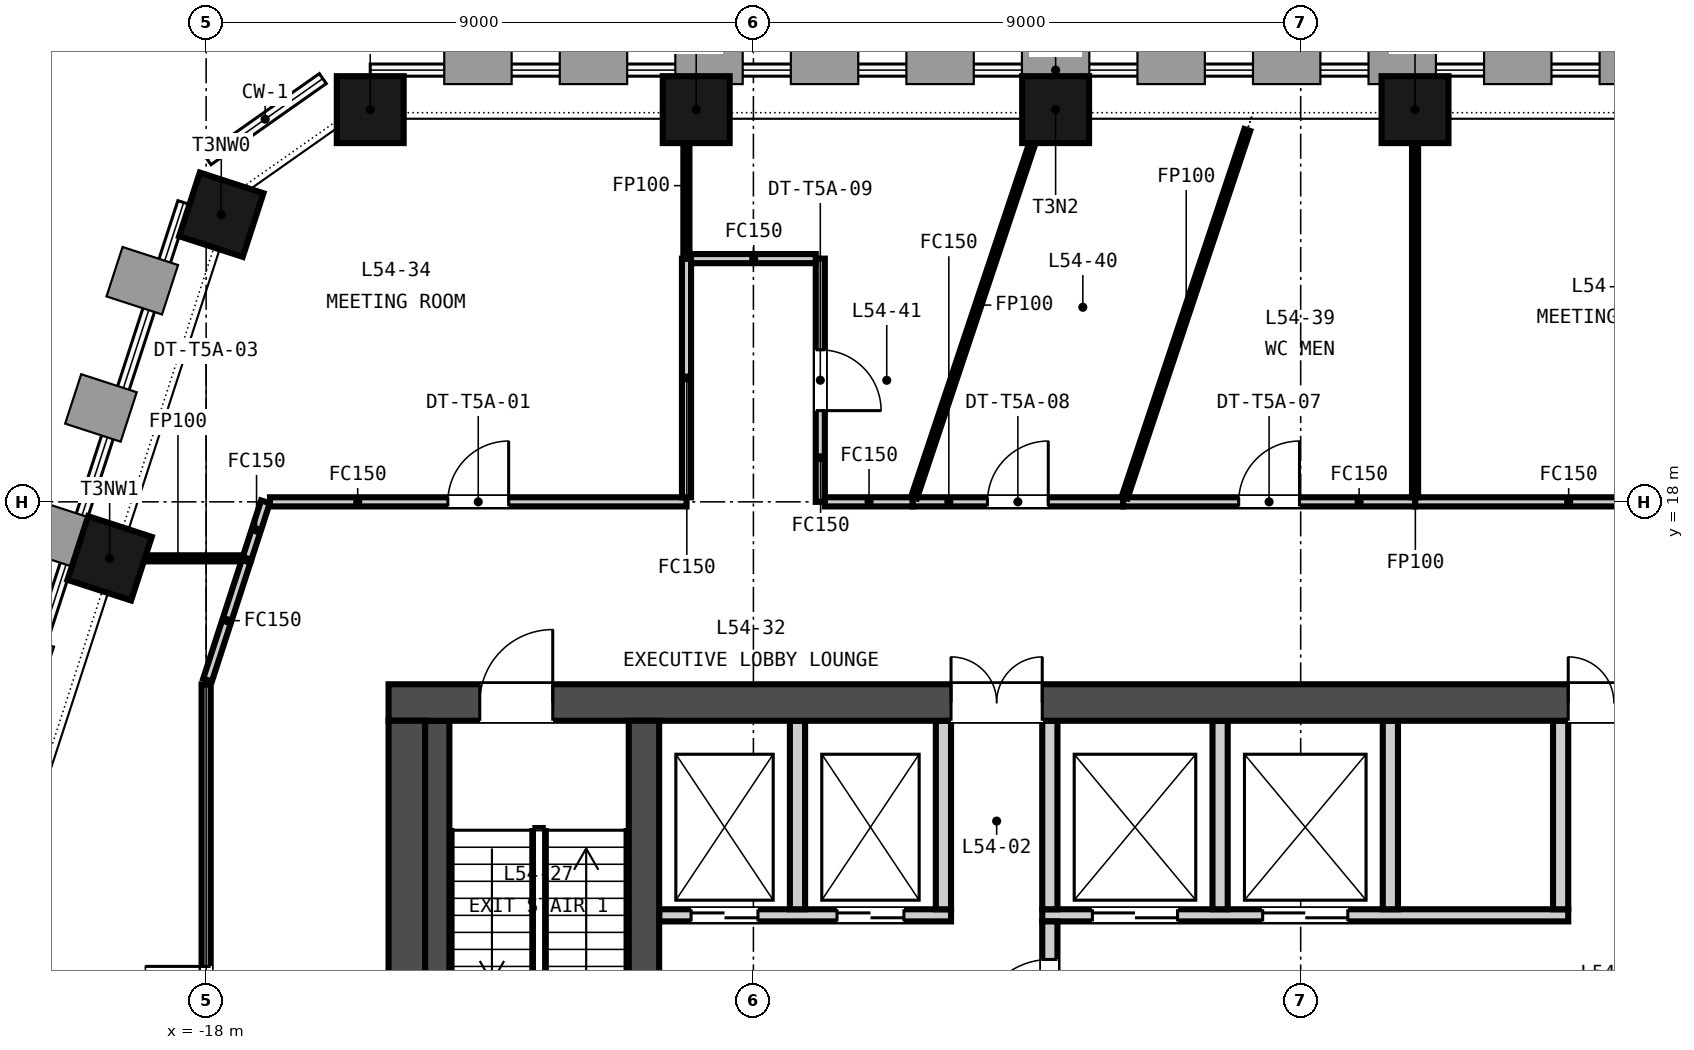
"""IFC4 building model, lengths in metres.
Left out: names, types, materials, properties, quantities, classifications, styles, units other than length and angle.
Written with IfcOpenShell. Run it as: python <this file> out.ifc"""

import sys

from ifc_helpers import new_model, si_unit, direction, frame, frame_2d, origin, origin_2d, place, context, subcontext, project, spatial, rectangle, extrude, element, fill, save


model = new_model("IFC4")
c1 = context("Model", 3, precision=1e-05, world=origin(), true_north=direction((0.0, 1.0)))
c2 = subcontext(c1, "Body", "Model", "MODEL_VIEW")
j1 = project(units=[si_unit("LENGTHUNIT", "METRE"), si_unit("PLANEANGLEUNIT", "RADIAN")], contexts=[c1])
p1 = place(None, origin())
s1 = spatial("IfcSite", under=j1, at=p1, CompositionType="ELEMENT")
p2 = place(p1, origin())
s2 = spatial("IfcBuilding", under=s1, at=p2, CompositionType="ELEMENT")
p3 = place(p2, frame((0.0, 0.0, 216.3)))
s3 = spatial("IfcBuildingStorey", under=s2, at=p3, CompositionType="ELEMENT", Elevation=216.3)
p4 = place(p3, frame((-15.0, 14.7, -0.15), z_axis=(0.0, 0.0, 1.0), x_axis=(1.0, 0.0, 0.0)))
e1 = element("IfcWall", 1, at=p4, inside=s3, PredefinedType="SOLIDWALL", context=c2, shape_type="SweptSolid", body=[
    extrude(rectangle(XDim=30.0, YDim=0.6, at=frame_2d((15.0, 0.0))), origin(), (0.0, 0.0, 1.0), 3.65),
])
p5 = place(p4, frame((9.25, 0.0, 0.15)))
e2 = element("IfcOpeningElement", 2, at=p5, cuts=e1, PredefinedType="OPENING", context=c2, shape_type="SweptSolid", body=[
    extrude(rectangle(XDim=1.5, YDim=2.1, at=frame_2d((0.75, 1.05))), frame((0.0, 0.31, 0.0), z_axis=(0.0, -1.0, 0.0), x_axis=(1.0, 0.0, 0.0)), (0.0, 0.0, 1.0), 0.62),
])
p6 = place(p4, frame((19.4, 0.0, 0.15)))
e3 = element("IfcOpeningElement", 3, at=p6, cuts=e1, PredefinedType="OPENING", context=c2, shape_type="SweptSolid", body=[
    extrude(rectangle(XDim=1.5, YDim=2.1, at=frame_2d((0.75, 1.05))), frame((0.0, 0.31, 0.0), z_axis=(0.0, -1.0, 0.0), x_axis=(1.0, 0.0, 0.0)), (0.0, 0.0, 1.0), 0.62),
])
p7 = place(p4, frame((1.5, 0.0, 0.15)))
e4 = element("IfcOpeningElement", 4, at=p7, cuts=e1, PredefinedType="OPENING", context=c2, shape_type="SweptSolid", body=[
    extrude(rectangle(XDim=1.2, YDim=2.1, at=frame_2d((0.6, 1.05))), frame((0.0, 0.31, 0.0), z_axis=(0.0, -1.0, 0.0), x_axis=(1.0, 0.0, 0.0)), (0.0, 0.0, 1.0), 0.62),
])
p8 = place(p4, frame((27.3, 0.0, 0.15)))
e5 = element("IfcOpeningElement", 5, at=p8, cuts=e1, PredefinedType="OPENING", context=c2, shape_type="SweptSolid", body=[
    extrude(rectangle(XDim=1.2, YDim=2.1, at=frame_2d((0.6, 1.05))), frame((0.0, 0.31, 0.0), z_axis=(0.0, -1.0, 0.0), x_axis=(1.0, 0.0, 0.0)), (0.0, 0.0, 1.0), 0.62),
])
p9 = place(p3, frame((-14.7, 0.6, -0.15), z_axis=(0.0, 0.0, 1.0), x_axis=(0.0, 1.0, 0.0)))
e6 = element("IfcWall", 6, at=p9, inside=s3, PredefinedType="SOLIDWALL", context=c2, shape_type="SweptSolid", body=[
    extrude(rectangle(XDim=13.8, YDim=0.6, at=frame_2d((6.9, 0.0))), origin(), (0.0, 0.0, 1.0), 3.65),
])
p10 = place(p3, frame((-10.8, 0.6, -0.15), z_axis=(0.0, 0.0, 1.0), x_axis=(0.0, 1.0, 0.0)))
e7 = element("IfcWall", 7, at=p10, inside=s3, PredefinedType="SOLIDWALL", context=c2, shape_type="SweptSolid", body=[
    extrude(rectangle(XDim=13.8, YDim=0.5, at=frame_2d((6.9, 0.0))), origin(), (0.0, 0.0, 1.0), 3.65),
])
for number, where, z_axis, x_axis in (
    (8, (1.881, 24.45, -0.15), (0.0, 0.0, 1.0), (-1.0, 0.0, 0.0)),
    (9, (-4.03, 24.45, -0.15), (0.0, 0.0, 1.0), (-1.0, 0.0, 0.0)),
    (10, (-9.941, 24.45, -0.15), (0.0, 0.0, 1.0), (-1.0, 0.0, 0.0)),
    (11, (-15.301, 24.45, -0.15), (0.0, 0.0, 1.0), (-1.0, 0.0, 0.0)),
    (12, (-17.751, 22.722, -0.15), (0.0, 0.0, 1.0), (-0.309, -0.951, 0.0)),
    (13, (-19.587, 17.071, -0.15), (0.0, 0.0, 1.0), (-0.309, -0.951, 0.0)),
):
    element("IfcColumn", number, at=place(p3, frame(where, z_axis=z_axis, x_axis=x_axis)), inside=s3, PredefinedType="COLUMN", context=c2, shape_type="SweptSolid", body=[
        extrude(rectangle(XDim=1.1, YDim=1.1, at=origin_2d()), origin(), (0.0, 0.0, 1.0), 3.65),
    ])
p11 = place(p3, frame((-10.55, 11.2, 0.0), z_axis=(0.0, 0.0, 1.0), x_axis=(1.0, 0.0, 0.0)))
e14 = element("IfcWall", 14, at=p11, inside=s3, PredefinedType="PARTITIONING", context=c2, shape_type="SweptSolid", body=[
    extrude(rectangle(XDim=4.8, YDim=0.2, at=frame_2d((2.4, 0.0))), origin(), (0.0, 0.0, 1.0), 3.5),
])
p12 = place(p11, frame((0.525, 0.0, 0.0)))
e15 = element("IfcOpeningElement", 15, at=p12, cuts=e14, PredefinedType="OPENING", context=c2, shape_type="SweptSolid", body=[
    extrude(rectangle(XDim=1.1, YDim=2.1, at=frame_2d((0.55, 1.05))), frame((0.0, 0.11, 0.0), z_axis=(0.0, -1.0, 0.0), x_axis=(1.0, 0.0, 0.0)), (0.0, 0.0, 1.0), 0.22),
])
p13 = place(p11, frame((2.925, 0.0, 0.0)))
e16 = element("IfcOpeningElement", 16, at=p13, cuts=e14, PredefinedType="OPENING", context=c2, shape_type="SweptSolid", body=[
    extrude(rectangle(XDim=1.1, YDim=2.1, at=frame_2d((0.55, 1.05))), frame((0.0, 0.11, 0.0), z_axis=(0.0, -1.0, 0.0), x_axis=(1.0, 0.0, 0.0)), (0.0, 0.0, 1.0), 0.22),
])
p14 = place(p3, frame((-4.25, 11.2, 0.0), z_axis=(0.0, 0.0, 1.0), x_axis=(1.0, 0.0, 0.0)))
e17 = element("IfcWall", 17, at=p14, inside=s3, PredefinedType="PARTITIONING", context=c2, shape_type="SweptSolid", body=[
    extrude(rectangle(XDim=8.65, YDim=0.2, at=frame_2d((4.325, 0.0))), origin(), (0.0, 0.0, 1.0), 3.5),
])
p15 = place(p14, frame((0.825, 0.0, 0.0)))
e18 = element("IfcOpeningElement", 18, at=p15, cuts=e17, PredefinedType="OPENING", context=c2, shape_type="SweptSolid", body=[
    extrude(rectangle(XDim=1.4, YDim=2.1, at=frame_2d((0.7, 1.05))), frame((0.0, 0.11, 0.0), z_axis=(0.0, -1.0, 0.0), x_axis=(1.0, 0.0, 0.0)), (0.0, 0.0, 1.0), 0.22),
])
p16 = place(p14, frame((3.625, 0.0, 0.0)))
e19 = element("IfcOpeningElement", 19, at=p16, cuts=e17, PredefinedType="OPENING", context=c2, shape_type="SweptSolid", body=[
    extrude(rectangle(XDim=1.4, YDim=2.1, at=frame_2d((0.7, 1.05))), frame((0.0, 0.11, 0.0), z_axis=(0.0, -1.0, 0.0), x_axis=(1.0, 0.0, 0.0)), (0.0, 0.0, 1.0), 0.22),
])
p17 = place(p3, frame((-4.125, 8.65, 0.0), z_axis=(0.0, 0.0, 1.0), x_axis=(0.0, 1.0, 0.0)))
e20 = element("IfcWall", 20, at=p17, inside=s3, PredefinedType="PARTITIONING", context=c2, shape_type="SweptSolid", body=[
    extrude(rectangle(XDim=2.45, YDim=0.25, at=frame_2d((1.225, 0.0))), origin(), (0.0, 0.0, 1.0), 3.5),
])
p18 = place(p17, frame((0.625, 0.0, 0.0)))
e21 = element("IfcOpeningElement", 21, at=p18, cuts=e20, PredefinedType="OPENING", context=c2, shape_type="SweptSolid", body=[
    extrude(rectangle(XDim=1.2, YDim=2.1, at=frame_2d((0.6, 1.05))), frame((0.0, 0.135, 0.0), z_axis=(0.0, -1.0, 0.0), x_axis=(1.0, 0.0, 0.0)), (0.0, 0.0, 1.0), 0.27),
])
for number, where, z_axis, x_axis in (
    (22, (-8.275, 11.3, 0.0), (0.0, 0.0, 1.0), (0.0, 1.0, 0.0)),
    (23, (-5.875, 11.3, 0.0), (0.0, 0.0, 1.0), (0.0, 1.0, 0.0)),
    (24, (-4.125, 11.3, 0.0), (0.0, 0.0, 1.0), (0.0, 1.0, 0.0)),
    (25, (-1.325, 11.3, 0.0), (0.0, 0.0, 1.0), (0.0, 1.0, 0.0)),
    (26, (1.475, 11.3, 0.0), (0.0, 0.0, 1.0), (0.0, 1.0, 0.0)),
    (27, (4.275, 11.3, 0.0), (0.0, 0.0, 1.0), (0.0, 1.0, 0.0)),
):
    element("IfcWall", number, at=place(p3, frame(where, z_axis=z_axis, x_axis=x_axis)), inside=s3, PredefinedType="PARTITIONING", context=c2, shape_type="SweptSolid", body=[
        extrude(rectangle(XDim=3.1, YDim=0.25, at=frame_2d((1.55, 0.0))), origin(), (0.0, 0.0, 1.0), 3.5),
    ])
p19 = place(p3, frame((-14.2, 0.6, 0.0), z_axis=(0.0, 0.0, 1.0), x_axis=(0.0, 1.0, 0.0)))
e28 = element("IfcWall", 28, at=p19, inside=s3, PredefinedType="SOLIDWALL", context=c2, shape_type="SweptSolid", body=[
    extrude(rectangle(XDim=13.8, YDim=0.4, at=frame_2d((6.9, 0.0))), origin(), (0.0, 0.0, 1.0), 3.5),
])
p20 = place(p3, frame((-7.9, 22.0, 0.0), z_axis=(0.0, 0.0, 1.0), x_axis=(0.0, -1.0, 0.0)))
e29 = element("IfcWall", 29, at=p20, inside=s3, PredefinedType="PARTITIONING", context=c2, shape_type="SweptSolid", body=[
    extrude(rectangle(XDim=4.0, YDim=0.15, at=frame_2d((2.0, 0.0))), origin(), (0.0, 0.0, 1.0), 2.751),
])
p21 = place(p20, frame((1.5, 0.0, 0.0)))
e30 = element("IfcOpeningElement", 30, at=p21, cuts=e29, PredefinedType="OPENING", context=c2, shape_type="SweptSolid", body=[
    extrude(rectangle(XDim=1.0, YDim=2.1, at=frame_2d((0.5, 1.05))), frame((0.0, 0.085, 0.0), z_axis=(0.0, -1.0, 0.0), x_axis=(1.0, 0.0, 0.0)), (0.0, 0.0, 1.0), 0.17),
])
p22 = place(p3, frame((-17.327, 17.071, 0.0), z_axis=(0.0, 0.0, 1.0), x_axis=(0.309170843074, 0.951006514064, 0.0)))
e31 = element("IfcWall", 31, at=p22, inside=s3, PredefinedType="PARTITIONING", context=c2, shape_type="SweptSolid", body=[
    extrude(rectangle(XDim=0.977, YDim=0.15, at=frame_2d((0.488, 0.0))), origin(), (0.0, 0.0, 1.0), 2.751),
])
p23 = place(p3, frame((-16.95, 18.0, 0.0), z_axis=(0.0, 0.0, 1.0), x_axis=(1.0, 0.0, 0.0)))
e32 = element("IfcWall", 32, at=p23, inside=s3, PredefinedType="PARTITIONING", context=c2, shape_type="SweptSolid", body=[
    extrude(rectangle(XDim=6.85, YDim=0.15, at=frame_2d((3.425, 0.0))), origin(), (0.0, 0.0, 1.0), 2.751),
])
p24 = place(p23, frame((2.925, 0.0, 0.0)))
e33 = element("IfcOpeningElement", 33, at=p24, cuts=e32, PredefinedType="OPENING", context=c2, shape_type="SweptSolid", body=[
    extrude(rectangle(XDim=1.0, YDim=2.1, at=frame_2d((0.5, 1.05))), frame((0.0, 0.085, 0.0), z_axis=(0.0, -1.0, 0.0), x_axis=(1.0, 0.0, 0.0)), (0.0, 0.0, 1.0), 0.17),
])
p25 = place(p3, frame((-10.1, 18.075, 0.0), z_axis=(0.0, 0.0, 1.0), x_axis=(0.0, 1.0, 0.0)))
e34 = element("IfcWall", 34, at=p25, inside=s3, PredefinedType="PARTITIONING", context=c2, shape_type="SweptSolid", body=[
    extrude(rectangle(XDim=3.925, YDim=0.15, at=frame_2d((1.962, 0.0))), origin(), (0.0, 0.0, 1.0), 2.751),
])
p26 = place(p3, frame((-19.535, 17.071, 0.0), z_axis=(0.0, 0.0, 1.0), x_axis=(1.0, 0.0, 0.0)))
e35 = element("IfcWall", 35, at=p26, inside=s3, PredefinedType="PARTITIONING", context=c2, shape_type="SweptSolid", body=[
    extrude(rectangle(XDim=2.133, YDim=0.1, at=frame_2d((1.066, 0.0))), origin(), (0.0, 0.0, 1.0), 2.751),
])
p27 = place(p3, frame((-10.102, 22.0, 0.0), z_axis=(0.0, 0.0, 1.0), x_axis=(0.0, 1.0, 0.0)))
e36 = element("IfcWall", 36, at=p27, inside=s3, PredefinedType="PARTITIONING", context=c2, shape_type="SweptSolid", body=[
    extrude(rectangle(XDim=2.4, YDim=0.1, at=frame_2d((1.2, 0.0))), origin(), (0.0, 0.0, 1.0), 2.751),
])
p28 = place(p3, frame((1.881, 18.0, 0.0), z_axis=(0.0, 0.0, 1.0), x_axis=(1.0, 0.0, 0.0)))
e37 = element("IfcWall", 37, at=p28, inside=s3, PredefinedType="PARTITIONING", context=c2, shape_type="SweptSolid", body=[
    extrude(rectangle(XDim=11.184, YDim=0.15, at=frame_2d((5.592, 0.0))), origin(), (0.0, 0.0, 1.0), 2.751),
])
p29 = place(p28, frame((5.092, 0.0, 0.0)))
e38 = element("IfcOpeningElement", 38, at=p29, cuts=e37, PredefinedType="OPENING", context=c2, shape_type="SweptSolid", body=[
    extrude(rectangle(XDim=1.0, YDim=2.1, at=frame_2d((0.5, 1.05))), frame((0.0, 0.085, 0.0), z_axis=(0.0, -1.0, 0.0), x_axis=(1.0, 0.0, 0.0)), (0.0, 0.0, 1.0), 0.17),
])
p30 = place(p3, frame((-18.0, 4.723, 0.0), z_axis=(0.0, 0.0, 1.0), x_axis=(0.0, 1.0, 0.0)))
e39 = element("IfcWall", 39, at=p30, inside=s3, PredefinedType="PARTITIONING", context=c2, shape_type="SweptSolid", body=[
    extrude(rectangle(XDim=10.275, YDim=0.15, at=frame_2d((5.138, 0.0))), origin(), (0.0, 0.0, 1.0), 2.751),
])
p31 = place(p30, frame((4.637, 0.0, 0.0)))
e40 = element("IfcOpeningElement", 40, at=p31, cuts=e39, PredefinedType="OPENING", context=c2, shape_type="SweptSolid", body=[
    extrude(rectangle(XDim=1.0, YDim=2.1, at=frame_2d((0.5, 1.05))), frame((0.0, 0.085, 0.0), z_axis=(0.0, -1.0, 0.0), x_axis=(1.0, 0.0, 0.0)), (0.0, 0.0, 1.0), 0.17),
])
p32 = place(p3, frame((-17.977, 15.069, 0.0), z_axis=(0.0, 0.0, 1.0), x_axis=(0.308838863498, 0.951114376084, 0.0)))
e41 = element("IfcWall", 41, at=p32, inside=s3, PredefinedType="PARTITIONING", context=c2, shape_type="SweptSolid", body=[
    extrude(rectangle(XDim=2.054, YDim=0.15, at=frame_2d((1.027, 0.0))), origin(), (0.0, 0.0, 1.0), 2.751),
])
p33 = place(p3, frame((-2.92, 18.0, 0.0), z_axis=(0.0, 0.0, 1.0), x_axis=(1.0, 0.0, 0.0)))
e42 = element("IfcWall", 42, at=p33, inside=s3, PredefinedType="PARTITIONING", context=c2, shape_type="SweptSolid", body=[
    extrude(rectangle(XDim=4.801, YDim=0.15, at=frame_2d((2.4, 0.0))), origin(), (0.0, 0.0, 1.0), 2.751),
])
p34 = place(p33, frame((1.9, 0.0, 0.0)))
e43 = element("IfcOpeningElement", 43, at=p34, cuts=e42, PredefinedType="OPENING", context=c2, shape_type="SweptSolid", body=[
    extrude(rectangle(XDim=1.0, YDim=2.1, at=frame_2d((0.5, 1.05))), frame((0.0, 0.085, 0.0), z_axis=(0.0, -1.0, 0.0), x_axis=(1.0, 0.0, 0.0)), (0.0, 0.0, 1.0), 0.17),
])
p35 = place(p3, frame((1.881, 18.075, 0.0), z_axis=(0.0, 0.0, 1.0), x_axis=(0.0, 1.0, 0.0)))
e44 = element("IfcWall", 44, at=p35, inside=s3, PredefinedType="PARTITIONING", context=c2, shape_type="SweptSolid", body=[
    extrude(rectangle(XDim=6.325, YDim=0.1, at=frame_2d((3.163, 0.0))), origin(), (0.0, 0.0, 1.0), 2.751),
])
p36 = place(p3, frame((-6.382, 18.0, 0.0), z_axis=(0.0, 0.0, 1.0), x_axis=(1.0, 0.0, 0.0)))
e45 = element("IfcWall", 45, at=p36, inside=s3, PredefinedType="PARTITIONING", context=c2, shape_type="SweptSolid", body=[
    extrude(rectangle(XDim=3.462, YDim=0.15, at=frame_2d((1.731, 0.0))), origin(), (0.0, 0.0, 1.0), 2.751),
])
p37 = place(p36, frame((1.231, 0.0, 0.0)))
e46 = element("IfcOpeningElement", 46, at=p37, cuts=e45, PredefinedType="OPENING", context=c2, shape_type="SweptSolid", body=[
    extrude(rectangle(XDim=1.0, YDim=2.1, at=frame_2d((0.5, 1.05))), frame((0.0, 0.085, 0.0), z_axis=(0.0, -1.0, 0.0), x_axis=(1.0, 0.0, 0.0)), (0.0, 0.0, 1.0), 0.17),
])
p38 = place(p3, frame((-2.896, 18.071, 0.0), z_axis=(0.0, 0.0, 1.0), x_axis=(0.316721942661, 0.948518429466, 0.0)))
e47 = element("IfcWall", 47, at=p38, inside=s3, PredefinedType="PARTITIONING", context=c2, shape_type="SweptSolid", body=[
    extrude(rectangle(XDim=6.373, YDim=0.1, at=frame_2d((3.186, 0.0))), origin(), (0.0, 0.0, 1.0), 2.751),
])
p39 = place(p3, frame((-10.025, 22.0, 0.0), z_axis=(0.0, 0.0, 1.0), x_axis=(1.0, 0.0, 0.0)))
e48 = element("IfcWall", 48, at=p39, inside=s3, PredefinedType="PARTITIONING", context=c2, shape_type="SweptSolid", body=[
    extrude(rectangle(XDim=2.05, YDim=0.15, at=frame_2d((1.025, 0.0))), origin(), (0.0, 0.0, 1.0), 2.751),
])
p40 = place(p3, frame((-7.825, 18.0, 0.0), z_axis=(0.0, 0.0, 1.0), x_axis=(1.0, 0.0, 0.0)))
e49 = element("IfcWall", 49, at=p40, inside=s3, PredefinedType="PARTITIONING", context=c2, shape_type="SweptSolid", body=[
    extrude(rectangle(XDim=1.443, YDim=0.15, at=frame_2d((0.721, 0.0))), origin(), (0.0, 0.0, 1.0), 2.751),
])
p41 = place(p3, frame((-6.358, 18.071, 0.0), z_axis=(0.0, 0.0, 1.0), x_axis=(0.316688766046, 0.9485295069, 0.0)))
e50 = element("IfcWall", 50, at=p41, inside=s3, PredefinedType="PARTITIONING", context=c2, shape_type="SweptSolid", body=[
    extrude(rectangle(XDim=6.672, YDim=0.1, at=frame_2d((3.336, 0.0))), origin(), (0.0, 0.0, 1.0), 2.751),
])
p42 = place(p18, origin())
e51 = element("IfcDoor", 51, at=p42, inside=s3, OperationType="SINGLE_SWING_LEFT", PredefinedType="DOOR", context=c2, shape_type="SweptSolid", body=[
    extrude(rectangle(XDim=1.2, YDim=2.1, at=frame_2d((0.6, 1.05))), frame((0.0, 0.025, 0.0), z_axis=(0.0, -1.0, 0.0), x_axis=(1.0, 0.0, 0.0)), (0.0, 0.0, 1.0), 0.05),
])
fill(e21, e51)
p43 = place(p12, origin())
e52 = element("IfcDoor", 52, at=p43, inside=s3, OperationType="DOUBLE_DOOR_SLIDING", PredefinedType="DOOR", context=c2, shape_type="SweptSolid", body=[
    extrude(rectangle(XDim=1.1, YDim=2.1, at=frame_2d((0.55, 1.05))), frame((0.0, 0.025, 0.0), z_axis=(0.0, -1.0, 0.0), x_axis=(1.0, 0.0, 0.0)), (0.0, 0.0, 1.0), 0.05),
])
fill(e15, e52)
p44 = place(p13, origin())
e53 = element("IfcDoor", 53, at=p44, inside=s3, OperationType="DOUBLE_DOOR_SLIDING", PredefinedType="DOOR", context=c2, shape_type="SweptSolid", body=[
    extrude(rectangle(XDim=1.1, YDim=2.1, at=frame_2d((0.55, 1.05))), frame((0.0, 0.025, 0.0), z_axis=(0.0, -1.0, 0.0), x_axis=(1.0, 0.0, 0.0)), (0.0, 0.0, 1.0), 0.05),
])
fill(e16, e53)
p45 = place(p15, origin())
e54 = element("IfcDoor", 54, at=p45, inside=s3, OperationType="DOUBLE_DOOR_SLIDING", PredefinedType="DOOR", context=c2, shape_type="SweptSolid", body=[
    extrude(rectangle(XDim=1.4, YDim=2.1, at=frame_2d((0.7, 1.05))), frame((0.0, 0.025, 0.0), z_axis=(0.0, -1.0, 0.0), x_axis=(1.0, 0.0, 0.0)), (0.0, 0.0, 1.0), 0.05),
])
fill(e18, e54)
p46 = place(p16, origin())
e55 = element("IfcDoor", 55, at=p46, inside=s3, OperationType="DOUBLE_DOOR_SLIDING", PredefinedType="DOOR", context=c2, shape_type="SweptSolid", body=[
    extrude(rectangle(XDim=1.4, YDim=2.1, at=frame_2d((0.7, 1.05))), frame((0.0, 0.025, 0.0), z_axis=(0.0, -1.0, 0.0), x_axis=(1.0, 0.0, 0.0)), (0.0, 0.0, 1.0), 0.05),
])
fill(e19, e55)
p47 = place(p5, origin())
e56 = element("IfcDoor", 56, at=p47, inside=s3, OperationType="DOUBLE_DOOR_SINGLE_SWING", PredefinedType="DOOR", context=c2, shape_type="SweptSolid", body=[
    extrude(rectangle(XDim=1.5, YDim=2.1, at=frame_2d((0.75, 1.05))), frame((0.0, 0.025, 0.0), z_axis=(0.0, -1.0, 0.0), x_axis=(1.0, 0.0, 0.0)), (0.0, 0.0, 1.0), 0.05),
])
fill(e2, e56)
p48 = place(p6, origin())
e57 = element("IfcDoor", 57, at=p48, inside=s3, OperationType="DOUBLE_DOOR_SINGLE_SWING", PredefinedType="DOOR", context=c2, shape_type="SweptSolid", body=[
    extrude(rectangle(XDim=1.5, YDim=2.1, at=frame_2d((0.75, 1.05))), frame((0.0, 0.025, 0.0), z_axis=(0.0, -1.0, 0.0), x_axis=(1.0, 0.0, 0.0)), (0.0, 0.0, 1.0), 0.05),
])
fill(e3, e57)
p49 = place(p7, origin())
e58 = element("IfcDoor", 58, at=p49, inside=s3, OperationType="SINGLE_SWING_RIGHT", PredefinedType="DOOR", context=c2, shape_type="SweptSolid", body=[
    extrude(rectangle(XDim=1.2, YDim=2.1, at=frame_2d((0.6, 1.05))), frame((0.0, 0.025, 0.0), z_axis=(0.0, -1.0, 0.0), x_axis=(1.0, 0.0, 0.0)), (0.0, 0.0, 1.0), 0.05),
])
fill(e4, e58)
p50 = place(p24, origin())
e59 = element("IfcDoor", 59, at=p50, inside=s3, OperationType="SINGLE_SWING_RIGHT", PredefinedType="DOOR", context=c2, shape_type="SweptSolid", body=[
    extrude(rectangle(XDim=1.0, YDim=2.1, at=frame_2d((0.5, 1.05))), frame((0.0, 0.025, 0.0), z_axis=(0.0, -1.0, 0.0), x_axis=(1.0, 0.0, 0.0)), (0.0, 0.0, 1.0), 0.05),
])
fill(e33, e59)
p51 = place(p31, origin())
e60 = element("IfcDoor", 60, at=p51, inside=s3, OperationType="SINGLE_SWING_RIGHT", PredefinedType="DOOR", context=c2, shape_type="SweptSolid", body=[
    extrude(rectangle(XDim=1.0, YDim=2.1, at=frame_2d((0.5, 1.05))), frame((0.0, 0.025, 0.0), z_axis=(0.0, -1.0, 0.0), x_axis=(1.0, 0.0, 0.0)), (0.0, 0.0, 1.0), 0.05),
])
fill(e40, e60)
p52 = place(p34, origin())
e61 = element("IfcDoor", 61, at=p52, inside=s3, OperationType="SINGLE_SWING_RIGHT", PredefinedType="DOOR", context=c2, shape_type="SweptSolid", body=[
    extrude(rectangle(XDim=1.0, YDim=2.1, at=frame_2d((0.5, 1.05))), frame((0.0, 0.025, 0.0), z_axis=(0.0, -1.0, 0.0), x_axis=(1.0, 0.0, 0.0)), (0.0, 0.0, 1.0), 0.05),
])
fill(e43, e61)
p53 = place(p37, origin())
e62 = element("IfcDoor", 62, at=p53, inside=s3, OperationType="SINGLE_SWING_RIGHT", PredefinedType="DOOR", context=c2, shape_type="SweptSolid", body=[
    extrude(rectangle(XDim=1.0, YDim=2.1, at=frame_2d((0.5, 1.05))), frame((0.0, 0.025, 0.0), z_axis=(0.0, -1.0, 0.0), x_axis=(1.0, 0.0, 0.0)), (0.0, 0.0, 1.0), 0.05),
])
fill(e46, e62)
p54 = place(p21, origin())
e63 = element("IfcDoor", 63, at=p54, inside=s3, OperationType="SINGLE_SWING_RIGHT", PredefinedType="DOOR", context=c2, shape_type="SweptSolid", body=[
    extrude(rectangle(XDim=1.0, YDim=2.1, at=frame_2d((0.5, 1.05))), frame((0.0, 0.025, 0.0), z_axis=(0.0, -1.0, 0.0), x_axis=(1.0, 0.0, 0.0)), (0.0, 0.0, 1.0), 0.05),
])
fill(e30, e63)
save(model, sys.argv[1])
